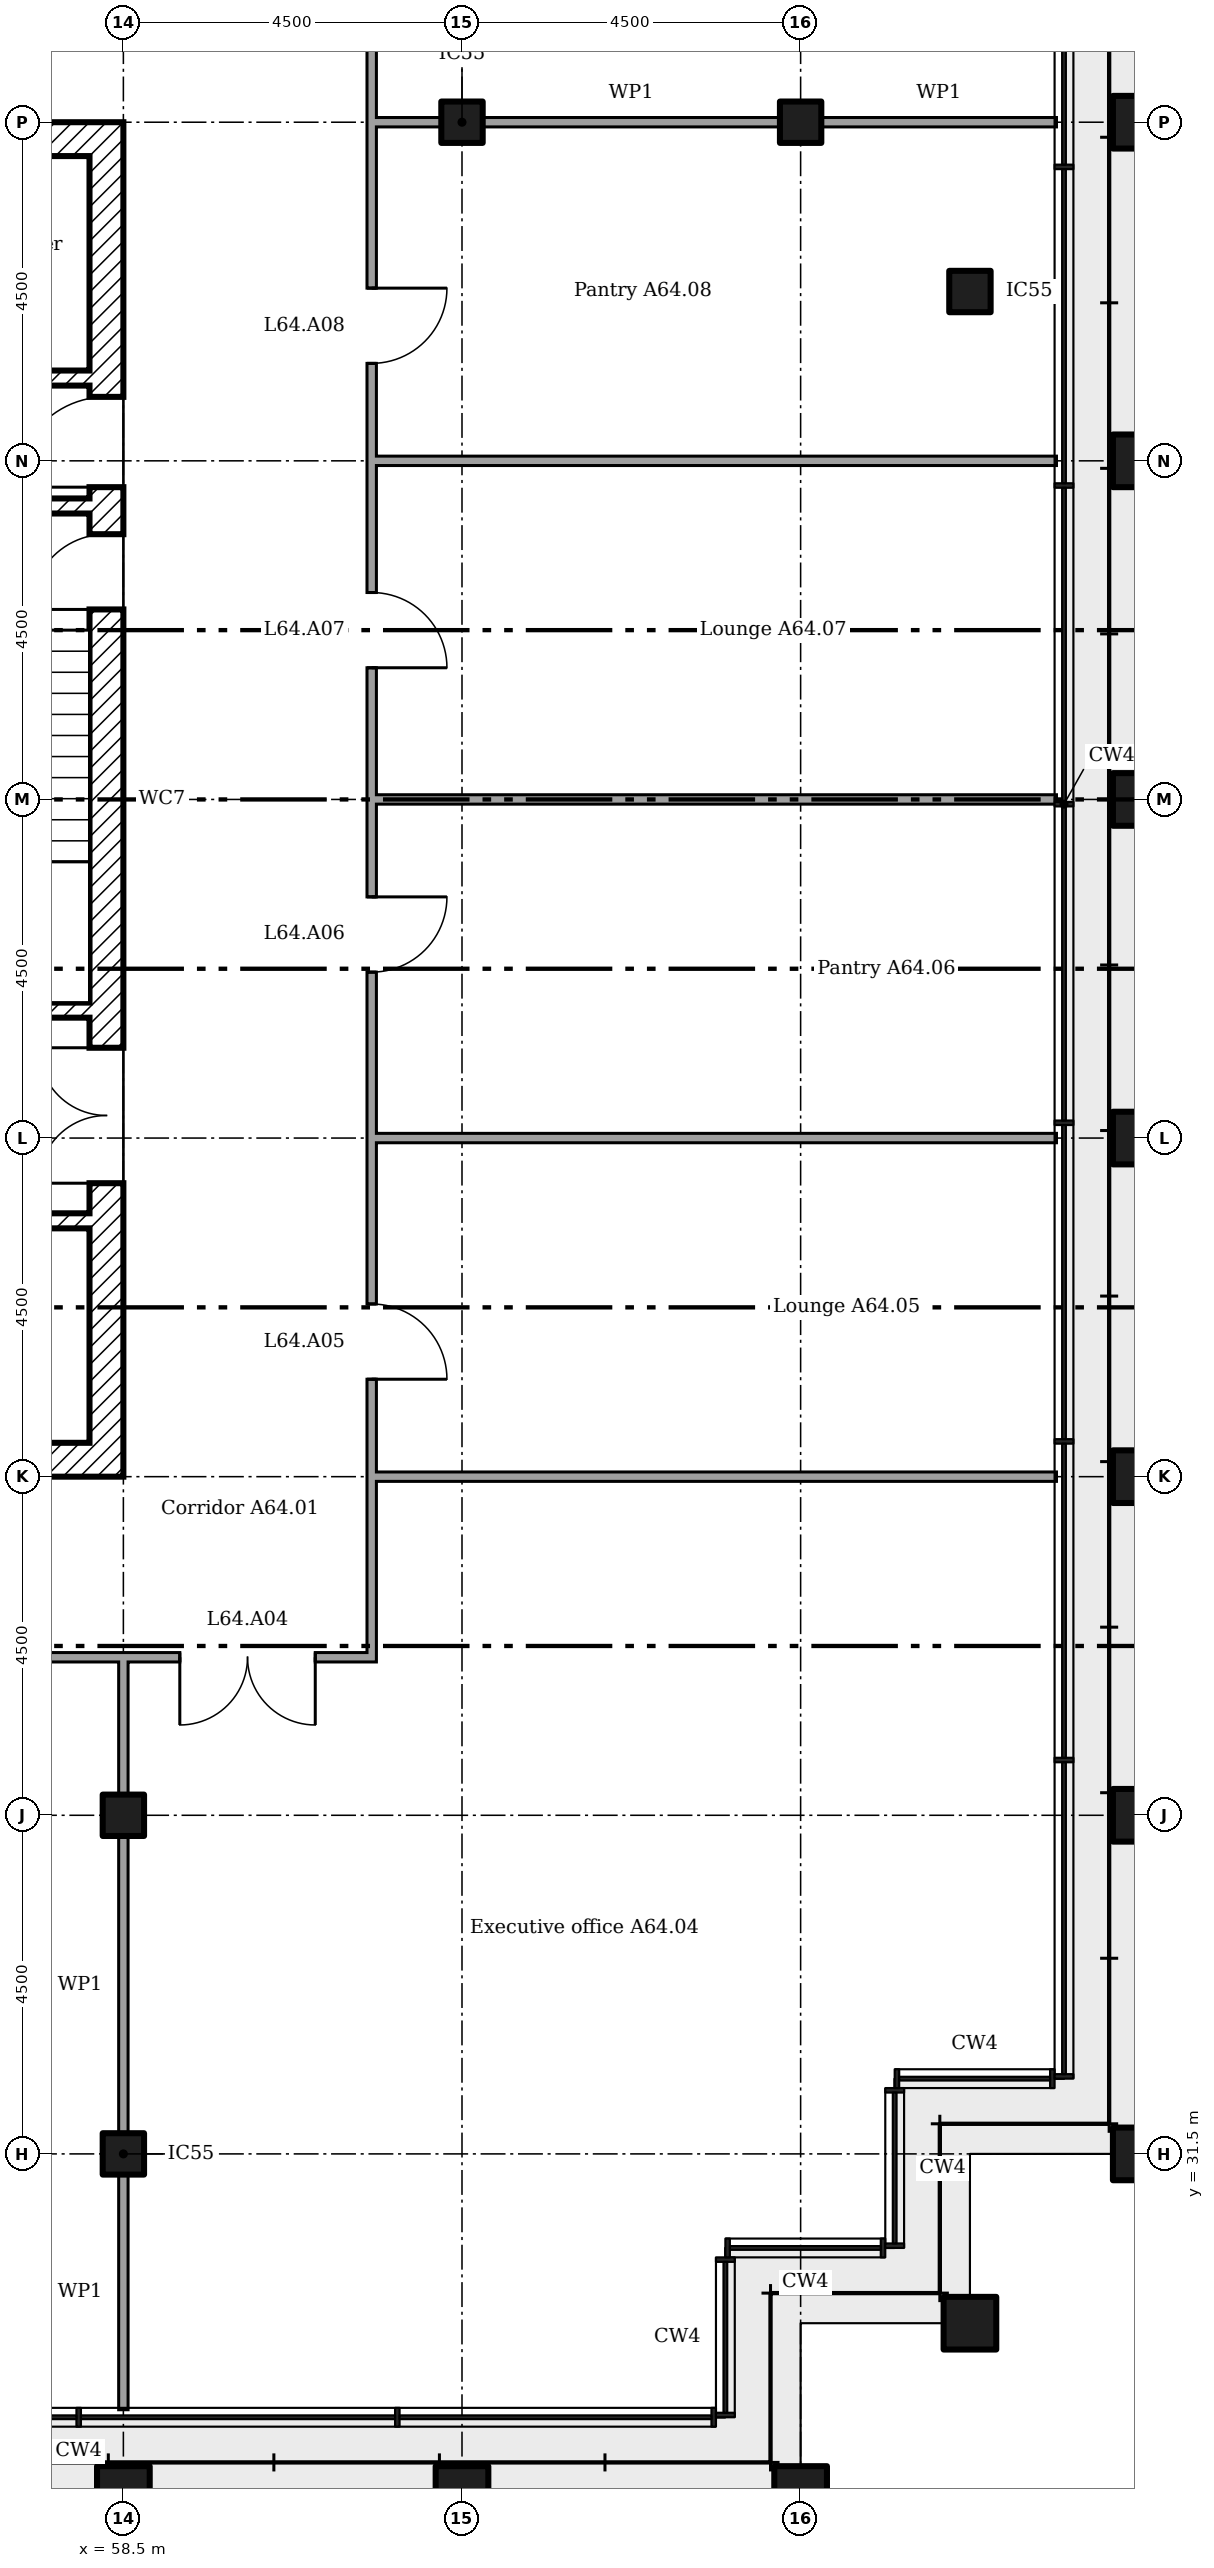
"""IFC4 building model, lengths in metres.
Left out: names, types, materials, properties, quantities, classifications, styles, units other than length and angle.
Written with IfcOpenShell. Run it as: python <this file> out.ifc"""

import sys

from ifc_helpers import new_model, si_unit, direction, frame, frame_2d, origin, origin_2d, place, context, subcontext, project, spatial, rectangle, extrude, element, fill, save


model = new_model("IFC4")
c1 = context("Model", 3, precision=1e-05, world=origin(), true_north=direction((0.0, 1.0)))
c2 = subcontext(c1, "Body", "Model", "MODEL_VIEW")
j1 = project(units=[si_unit("LENGTHUNIT", "METRE"), si_unit("PLANEANGLEUNIT", "RADIAN")], contexts=[c1])
p1 = place(None, origin())
s1 = spatial("IfcSite", under=j1, at=p1, CompositionType="ELEMENT")
p2 = place(p1, origin())
s2 = spatial("IfcBuilding", under=s1, at=p2, CompositionType="ELEMENT")
p3 = place(p2, frame((0.0, 0.0, 251.0)))
s3 = spatial("IfcBuildingStorey", under=s2, at=p3, CompositionType="ELEMENT", Elevation=251.0)
for number, where in (
    (1, (58.5, 27.0, 0.0)),
    (2, (63.0, 27.0, 0.0)),
    (3, (67.5, 27.0, 0.0)),
    (4, (69.75, 29.25, 0.0)),
    (5, (72.0, 31.5, 0.0)),
    (6, (72.0, 36.0, 0.0)),
    (7, (72.0, 40.5, 0.0)),
    (8, (72.0, 45.0, 0.0)),
    (9, (72.0, 49.5, 0.0)),
    (10, (72.0, 54.0, 0.0)),
    (11, (72.0, 58.5, 0.0)),
):
    element("IfcColumn", number, at=place(p3, frame(where)), inside=s3, PredefinedType="COLUMN", context=c2, shape_type="SweptSolid", body=[
        extrude(rectangle(XDim=0.7, YDim=0.7, at=origin_2d()), origin(), (0.0, 0.0, 1.0), 4.2),
    ])
for number, where in (
    (12, (58.5, 31.5, 0.0)),
    (13, (58.5, 36.0, 0.0)),
    (14, (63.0, 58.5, 0.0)),
    (15, (67.5, 58.5, 0.0)),
    (16, (69.75, 56.25, 0.0)),
):
    element("IfcColumn", number, at=place(p3, frame(where)), inside=s3, PredefinedType="COLUMN", context=c2, shape_type="SweptSolid", body=[
        extrude(rectangle(XDim=0.55, YDim=0.55, at=origin_2d()), origin(), (0.0, 0.0, 1.0), 4.2),
    ])
p4 = place(p3, frame((58.275, 40.5, 0.0), z_axis=(0.0, 0.0, 1.0), x_axis=(0.0, 1.0, 0.0)))
e17 = element("IfcWall", 17, at=p4, inside=s3, PredefinedType="SHEAR", context=c2, shape_type="SweptSolid", body=[
    extrude(rectangle(XDim=18.0, YDim=0.45, at=frame_2d((9.0, 0.0))), origin(), (0.0, 0.0, 1.0), 3.78),
])
p5 = place(p4, frame((13.15, 0.0, 0.0)))
e18 = element("IfcOpeningElement", 18, at=p5, cuts=e17, PredefinedType="OPENING", context=c2, shape_type="SweptSolid", body=[
    extrude(rectangle(XDim=1.2, YDim=2.1, at=frame_2d((0.6, 1.05))), frame((0.0, 0.235, 0.0), z_axis=(0.0, -1.0, 0.0), x_axis=(1.0, 0.0, 0.0)), (0.0, 0.0, 1.0), 0.47),
])
p6 = place(p4, frame((3.9, 0.0, 0.0)))
e19 = element("IfcOpeningElement", 19, at=p6, cuts=e17, PredefinedType="OPENING", context=c2, shape_type="SweptSolid", body=[
    extrude(rectangle(XDim=1.8, YDim=2.1, at=frame_2d((0.9, 1.05))), frame((0.0, 0.235, 0.0), z_axis=(0.0, -1.0, 0.0), x_axis=(1.0, 0.0, 0.0)), (0.0, 0.0, 1.0), 0.47),
])
p7 = place(p4, frame((11.525, 0.0, 0.0)))
e20 = element("IfcOpeningElement", 20, at=p7, cuts=e17, PredefinedType="OPENING", context=c2, shape_type="SweptSolid", body=[
    extrude(rectangle(XDim=1.0, YDim=2.1, at=frame_2d((0.5, 1.05))), frame((0.0, 0.235, 0.0), z_axis=(0.0, -1.0, 0.0), x_axis=(1.0, 0.0, 0.0)), (0.0, 0.0, 1.0), 0.47),
])
for number, where in (
    (21, (40.5, 58.275, 0.0)),
    (22, (40.5, 40.725, 0.0)),
):
    element("IfcWall", number, at=place(p3, frame(where)), inside=s3, PredefinedType="SHEAR", context=c2, shape_type="SweptSolid", body=[
        extrude(rectangle(XDim=17.55, YDim=0.45, at=frame_2d((8.775, 0.0))), origin(), (0.0, 0.0, 1.0), 3.78),
    ])
p8 = place(p3, frame((46.933, 55.1, 0.0)))
e23 = element("IfcWall", 23, at=p8, inside=s3, PredefinedType="SHEAR", context=c2, shape_type="SweptSolid", body=[
    extrude(rectangle(XDim=11.117, YDim=0.2, at=frame_2d((5.558, 0.0))), origin(), (0.0, 0.0, 1.0), 3.78),
])
p9 = place(p8, frame((8.833, 0.0, 0.0)))
e24 = element("IfcOpeningElement", 24, at=p9, cuts=e23, PredefinedType="OPENING", context=c2, shape_type="SweptSolid", body=[
    extrude(rectangle(XDim=0.9, YDim=2.1, at=frame_2d((0.45, 1.05))), frame((0.0, 0.11, 0.0), z_axis=(0.0, -1.0, 0.0), x_axis=(1.0, 0.0, 0.0)), (0.0, 0.0, 1.0), 0.22),
])
p10 = place(p8, frame((0.633, 0.0, 0.0)))
e25 = element("IfcOpeningElement", 25, at=p10, cuts=e23, PredefinedType="OPENING", context=c2, shape_type="SweptSolid", body=[
    extrude(rectangle(XDim=1.2, YDim=2.1, at=frame_2d((0.6, 1.05))), frame((0.0, 0.11, 0.0), z_axis=(0.0, -1.0, 0.0), x_axis=(1.0, 0.0, 0.0)), (0.0, 0.0, 1.0), 0.22),
])
p11 = place(p8, frame((3.3, 0.0, 0.0)))
e26 = element("IfcOpeningElement", 26, at=p11, cuts=e23, PredefinedType="OPENING", context=c2, shape_type="SweptSolid", body=[
    extrude(rectangle(XDim=1.2, YDim=2.1, at=frame_2d((0.6, 1.05))), frame((0.0, 0.11, 0.0), z_axis=(0.0, -1.0, 0.0), x_axis=(1.0, 0.0, 0.0)), (0.0, 0.0, 1.0), 0.22),
])
p12 = place(p8, frame((5.967, 0.0, 0.0)))
e27 = element("IfcOpeningElement", 27, at=p12, cuts=e23, PredefinedType="OPENING", context=c2, shape_type="SweptSolid", body=[
    extrude(rectangle(XDim=1.2, YDim=2.1, at=frame_2d((0.6, 1.05))), frame((0.0, 0.11, 0.0), z_axis=(0.0, -1.0, 0.0), x_axis=(1.0, 0.0, 0.0)), (0.0, 0.0, 1.0), 0.22),
])
p13 = place(p3, frame((40.95, 43.9, 0.0)))
e28 = element("IfcWall", 28, at=p13, inside=s3, PredefinedType="SHEAR", context=c2, shape_type="SweptSolid", body=[
    extrude(rectangle(XDim=17.1, YDim=0.2, at=frame_2d((8.55, 0.0))), origin(), (0.0, 0.0, 1.0), 3.78),
])
p14 = place(p13, frame((1.433, 0.0, 0.0)))
e29 = element("IfcOpeningElement", 29, at=p14, cuts=e28, PredefinedType="OPENING", context=c2, shape_type="SweptSolid", body=[
    extrude(rectangle(XDim=0.9, YDim=2.1, at=frame_2d((0.45, 1.05))), frame((0.0, 0.11, 0.0), z_axis=(0.0, -1.0, 0.0), x_axis=(1.0, 0.0, 0.0)), (0.0, 0.0, 1.0), 0.22),
])
p15 = place(p13, frame((4.1, 0.0, 0.0)))
e30 = element("IfcOpeningElement", 30, at=p15, cuts=e28, PredefinedType="OPENING", context=c2, shape_type="SweptSolid", body=[
    extrude(rectangle(XDim=0.9, YDim=2.1, at=frame_2d((0.45, 1.05))), frame((0.0, 0.11, 0.0), z_axis=(0.0, -1.0, 0.0), x_axis=(1.0, 0.0, 0.0)), (0.0, 0.0, 1.0), 0.22),
])
p16 = place(p13, frame((6.767, 0.0, 0.0)))
e31 = element("IfcOpeningElement", 31, at=p16, cuts=e28, PredefinedType="OPENING", context=c2, shape_type="SweptSolid", body=[
    extrude(rectangle(XDim=0.9, YDim=2.1, at=frame_2d((0.45, 1.05))), frame((0.0, 0.11, 0.0), z_axis=(0.0, -1.0, 0.0), x_axis=(1.0, 0.0, 0.0)), (0.0, 0.0, 1.0), 0.22),
])
p17 = place(p13, frame((9.433, 0.0, 0.0)))
e32 = element("IfcOpeningElement", 32, at=p17, cuts=e28, PredefinedType="OPENING", context=c2, shape_type="SweptSolid", body=[
    extrude(rectangle(XDim=0.9, YDim=2.1, at=frame_2d((0.45, 1.05))), frame((0.0, 0.11, 0.0), z_axis=(0.0, -1.0, 0.0), x_axis=(1.0, 0.0, 0.0)), (0.0, 0.0, 1.0), 0.22),
])
p18 = place(p13, frame((12.1, 0.0, 0.0)))
e33 = element("IfcOpeningElement", 33, at=p18, cuts=e28, PredefinedType="OPENING", context=c2, shape_type="SweptSolid", body=[
    extrude(rectangle(XDim=0.9, YDim=2.1, at=frame_2d((0.45, 1.05))), frame((0.0, 0.11, 0.0), z_axis=(0.0, -1.0, 0.0), x_axis=(1.0, 0.0, 0.0)), (0.0, 0.0, 1.0), 0.22),
])
p19 = place(p3, frame((54.8, 53.4, 0.0)))
e34 = element("IfcWall", 34, at=p19, inside=s3, PredefinedType="SHEAR", context=c2, shape_type="SweptSolid", body=[
    extrude(rectangle(XDim=3.25, YDim=0.2, at=frame_2d((1.625, 0.0))), origin(), (0.0, 0.0, 1.0), 3.78),
])
p20 = place(p19, frame((0.95, 0.0, 0.0)))
e35 = element("IfcOpeningElement", 35, at=p20, cuts=e34, PredefinedType="OPENING", context=c2, shape_type="SweptSolid", body=[
    extrude(rectangle(XDim=1.0, YDim=2.1, at=frame_2d((0.5, 1.05))), frame((0.0, 0.11, 0.0), z_axis=(0.0, -1.0, 0.0), x_axis=(1.0, 0.0, 0.0)), (0.0, 0.0, 1.0), 0.22),
])
p21 = place(p3, frame((54.8, 46.7, 0.0)))
e36 = element("IfcWall", 36, at=p21, inside=s3, PredefinedType="SHEAR", context=c2, shape_type="SweptSolid", body=[
    extrude(rectangle(XDim=3.25, YDim=0.2, at=frame_2d((1.625, 0.0))), origin(), (0.0, 0.0, 1.0), 3.78),
])
p22 = place(p3, frame((37.738, 38.1, 0.0)))
e37 = element("IfcWall", 37, at=p22, inside=s3, PredefinedType="PARTITIONING", context=c2, shape_type="SweptSolid", body=[
    extrude(rectangle(XDim=24.125, YDim=0.125, at=frame_2d((12.062, 0.0))), origin(), (0.0, 0.0, 1.0), 4.025),
])
p23 = place(p22, frame((0.512, 0.0, 0.0)))
e38 = element("IfcOpeningElement", 38, at=p23, cuts=e37, PredefinedType="OPENING", context=c2, shape_type="SweptSolid", body=[
    extrude(rectangle(XDim=1.8, YDim=2.1, at=frame_2d((0.9, 1.05))), frame((0.0, 0.073, 0.0), z_axis=(0.0, -1.0, 0.0), x_axis=(1.0, 0.0, 0.0)), (0.0, 0.0, 1.0), 0.145),
])
p24 = place(p22, frame((6.722, 0.0, 0.0)))
e39 = element("IfcOpeningElement", 39, at=p24, cuts=e37, PredefinedType="OPENING", context=c2, shape_type="SweptSolid", body=[
    extrude(rectangle(XDim=1.8, YDim=2.1, at=frame_2d((0.9, 1.05))), frame((0.0, 0.073, 0.0), z_axis=(0.0, -1.0, 0.0), x_axis=(1.0, 0.0, 0.0)), (0.0, 0.0, 1.0), 0.145),
])
p25 = place(p22, frame((18.468, 0.0, 0.0)))
e40 = element("IfcOpeningElement", 40, at=p25, cuts=e37, PredefinedType="OPENING", context=c2, shape_type="SweptSolid", body=[
    extrude(rectangle(XDim=1.0, YDim=2.1, at=frame_2d((0.5, 1.05))), frame((0.0, 0.073, 0.0), z_axis=(0.0, -1.0, 0.0), x_axis=(1.0, 0.0, 0.0)), (0.0, 0.0, 1.0), 0.145),
])
p26 = place(p22, frame((21.512, 0.0, 0.0)))
e41 = element("IfcOpeningElement", 41, at=p26, cuts=e37, PredefinedType="OPENING", context=c2, shape_type="SweptSolid", body=[
    extrude(rectangle(XDim=1.8, YDim=2.1, at=frame_2d((0.9, 1.05))), frame((0.0, 0.073, 0.0), z_axis=(0.0, -1.0, 0.0), x_axis=(1.0, 0.0, 0.0)), (0.0, 0.0, 1.0), 0.145),
])
for number, where in (
    (42, (61.8, 40.5, 0.0)),
    (43, (61.8, 45.0, 0.0)),
    (44, (61.8, 49.5, 0.0)),
    (45, (61.8, 54.0, 0.0)),
):
    element("IfcWall", number, at=place(p3, frame(where)), inside=s3, PredefinedType="PARTITIONING", context=c2, shape_type="SweptSolid", body=[
        extrude(rectangle(XDim=9.1, YDim=0.125, at=frame_2d((4.55, 0.0))), origin(), (0.0, 0.0, 1.0), 3.341),
    ])
p27 = place(p3, frame((61.8, 58.5, 0.0)))
e46 = element("IfcWall", 46, at=p27, inside=s3, PredefinedType="PARTITIONING", context=c2, shape_type="SweptSolid", body=[
    extrude(rectangle(XDim=0.925, YDim=0.125, at=frame_2d((0.462, 0.0))), origin(), (0.0, 0.0, 1.0), 3.251),
])
p28 = place(p3, frame((63.275, 58.5, 0.0)))
e47 = element("IfcWall", 47, at=p28, inside=s3, PredefinedType="PARTITIONING", context=c2, shape_type="SweptSolid", body=[
    extrude(rectangle(XDim=3.95, YDim=0.125, at=frame_2d((1.975, 0.0))), origin(), (0.0, 0.0, 1.0), 3.251),
])
p29 = place(p3, frame((67.775, 58.5, 0.0)))
e48 = element("IfcWall", 48, at=p29, inside=s3, PredefinedType="PARTITIONING", context=c2, shape_type="SweptSolid", body=[
    extrude(rectangle(XDim=3.125, YDim=0.125, at=frame_2d((1.562, 0.0))), origin(), (0.0, 0.0, 1.0), 3.251),
])
p30 = place(p3, frame((58.5, 28.1, 0.0), z_axis=(0.0, 0.0, 1.0), x_axis=(0.0, 1.0, 0.0)))
e49 = element("IfcWall", 49, at=p30, inside=s3, PredefinedType="PARTITIONING", context=c2, shape_type="SweptSolid", body=[
    extrude(rectangle(XDim=3.125, YDim=0.125, at=frame_2d((1.562, 0.0))), origin(), (0.0, 0.0, 1.0), 3.251),
])
p31 = place(p3, frame((58.5, 31.775, 0.0), z_axis=(0.0, 0.0, 1.0), x_axis=(0.0, 1.0, 0.0)))
e50 = element("IfcWall", 50, at=p31, inside=s3, PredefinedType="PARTITIONING", context=c2, shape_type="SweptSolid", body=[
    extrude(rectangle(XDim=3.95, YDim=0.125, at=frame_2d((1.975, 0.0))), origin(), (0.0, 0.0, 1.0), 3.251),
])
p32 = place(p3, frame((58.5, 36.275, 0.0), z_axis=(0.0, 0.0, 1.0), x_axis=(0.0, 1.0, 0.0)))
e51 = element("IfcWall", 51, at=p32, inside=s3, PredefinedType="PARTITIONING", context=c2, shape_type="SweptSolid", body=[
    extrude(rectangle(XDim=1.825, YDim=0.125, at=frame_2d((0.913, 0.0))), origin(), (0.0, 0.0, 1.0), 3.251),
])
p33 = place(p3, frame((61.8, 38.163, 0.0), z_axis=(0.0, 0.0, 1.0), x_axis=(0.0, 1.0, 0.0)))
e52 = element("IfcWall", 52, at=p33, inside=s3, PredefinedType="PARTITIONING", context=c2, shape_type="SweptSolid", body=[
    extrude(rectangle(XDim=22.075, YDim=0.125, at=frame_2d((11.038, 0.0))), origin(), (0.0, 0.0, 1.0), 4.025),
])
p34 = place(p33, frame((3.633, 0.0, 0.0)))
e53 = element("IfcOpeningElement", 53, at=p34, cuts=e52, PredefinedType="OPENING", context=c2, shape_type="SweptSolid", body=[
    extrude(rectangle(XDim=1.0, YDim=2.1, at=frame_2d((0.5, 1.05))), frame((0.0, 0.073, 0.0), z_axis=(0.0, -1.0, 0.0), x_axis=(1.0, 0.0, 0.0)), (0.0, 0.0, 1.0), 0.145),
])
p35 = place(p33, frame((9.042, 0.0, 0.0)))
e54 = element("IfcOpeningElement", 54, at=p35, cuts=e52, PredefinedType="OPENING", context=c2, shape_type="SweptSolid", body=[
    extrude(rectangle(XDim=1.0, YDim=2.1, at=frame_2d((0.5, 1.05))), frame((0.0, 0.073, 0.0), z_axis=(0.0, -1.0, 0.0), x_axis=(1.0, 0.0, 0.0)), (0.0, 0.0, 1.0), 0.145),
])
p36 = place(p33, frame((13.087, 0.0, 0.0)))
e55 = element("IfcOpeningElement", 55, at=p36, cuts=e52, PredefinedType="OPENING", context=c2, shape_type="SweptSolid", body=[
    extrude(rectangle(XDim=1.0, YDim=2.1, at=frame_2d((0.5, 1.05))), frame((0.0, 0.073, 0.0), z_axis=(0.0, -1.0, 0.0), x_axis=(1.0, 0.0, 0.0)), (0.0, 0.0, 1.0), 0.145),
])
p37 = place(p33, frame((17.133, 0.0, 0.0)))
e56 = element("IfcOpeningElement", 56, at=p37, cuts=e52, PredefinedType="OPENING", context=c2, shape_type="SweptSolid", body=[
    extrude(rectangle(XDim=1.0, YDim=2.1, at=frame_2d((0.5, 1.05))), frame((0.0, 0.073, 0.0), z_axis=(0.0, -1.0, 0.0), x_axis=(1.0, 0.0, 0.0)), (0.0, 0.0, 1.0), 0.145),
])
p38 = place(p5, origin())
e57 = element("IfcDoor", 57, at=p38, inside=s3, OperationType="SINGLE_SWING_RIGHT", PredefinedType="DOOR", context=c2, shape_type="SweptSolid", body=[
    extrude(rectangle(XDim=1.2, YDim=2.1, at=frame_2d((0.6, 1.05))), frame((0.0, 0.025, 0.0), z_axis=(0.0, -1.0, 0.0), x_axis=(1.0, 0.0, 0.0)), (0.0, 0.0, 1.0), 0.05),
])
fill(e18, e57)
p39 = place(p6, origin())
e58 = element("IfcDoor", 58, at=p39, inside=s3, OperationType="DOUBLE_DOOR_SINGLE_SWING", PredefinedType="DOOR", context=c2, shape_type="SweptSolid", body=[
    extrude(rectangle(XDim=1.8, YDim=2.1, at=frame_2d((0.9, 1.05))), frame((0.0, 0.025, 0.0), z_axis=(0.0, -1.0, 0.0), x_axis=(1.0, 0.0, 0.0)), (0.0, 0.0, 1.0), 0.05),
])
fill(e19, e58)
p40 = place(p7, origin())
e59 = element("IfcDoor", 59, at=p40, inside=s3, OperationType="SINGLE_SWING_RIGHT", PredefinedType="DOOR", context=c2, shape_type="SweptSolid", body=[
    extrude(rectangle(XDim=1.0, YDim=2.1, at=frame_2d((0.5, 1.05))), frame((0.0, 0.025, 0.0), z_axis=(0.0, -1.0, 0.0), x_axis=(1.0, 0.0, 0.0)), (0.0, 0.0, 1.0), 0.05),
])
fill(e20, e59)
p41 = place(p26, frame((1.8, 0.0, 0.0), x_axis=(-1.0, 0.0, 0.0)))
e60 = element("IfcDoor", 60, at=p41, inside=s3, OperationType="DOUBLE_DOOR_SINGLE_SWING", PredefinedType="DOOR", context=c2, shape_type="SweptSolid", body=[
    extrude(rectangle(XDim=1.8, YDim=2.1, at=frame_2d((0.9, 1.05))), frame((0.0, 0.025, 0.0), z_axis=(0.0, -1.0, 0.0), x_axis=(1.0, 0.0, 0.0)), (0.0, 0.0, 1.0), 0.05),
])
fill(e41, e60)
p42 = place(p34, frame((1.0, 0.0, 0.0), x_axis=(-1.0, 0.0, 0.0)))
e61 = element("IfcDoor", 61, at=p42, inside=s3, OperationType="SINGLE_SWING_LEFT", PredefinedType="DOOR", context=c2, shape_type="SweptSolid", body=[
    extrude(rectangle(XDim=1.0, YDim=2.1, at=frame_2d((0.5, 1.05))), frame((0.0, 0.025, 0.0), z_axis=(0.0, -1.0, 0.0), x_axis=(1.0, 0.0, 0.0)), (0.0, 0.0, 1.0), 0.05),
])
fill(e53, e61)
p43 = place(p35, frame((1.0, 0.0, 0.0), x_axis=(-1.0, 0.0, 0.0)))
e62 = element("IfcDoor", 62, at=p43, inside=s3, OperationType="SINGLE_SWING_RIGHT", PredefinedType="DOOR", context=c2, shape_type="SweptSolid", body=[
    extrude(rectangle(XDim=1.0, YDim=2.1, at=frame_2d((0.5, 1.05))), frame((0.0, 0.025, 0.0), z_axis=(0.0, -1.0, 0.0), x_axis=(1.0, 0.0, 0.0)), (0.0, 0.0, 1.0), 0.05),
])
fill(e54, e62)
p44 = place(p36, frame((1.0, 0.0, 0.0), x_axis=(-1.0, 0.0, 0.0)))
e63 = element("IfcDoor", 63, at=p44, inside=s3, OperationType="SINGLE_SWING_LEFT", PredefinedType="DOOR", context=c2, shape_type="SweptSolid", body=[
    extrude(rectangle(XDim=1.0, YDim=2.1, at=frame_2d((0.5, 1.05))), frame((0.0, 0.025, 0.0), z_axis=(0.0, -1.0, 0.0), x_axis=(1.0, 0.0, 0.0)), (0.0, 0.0, 1.0), 0.05),
])
fill(e55, e63)
p45 = place(p37, frame((1.0, 0.0, 0.0), x_axis=(-1.0, 0.0, 0.0)))
e64 = element("IfcDoor", 64, at=p45, inside=s3, OperationType="SINGLE_SWING_RIGHT", PredefinedType="DOOR", context=c2, shape_type="SweptSolid", body=[
    extrude(rectangle(XDim=1.0, YDim=2.1, at=frame_2d((0.5, 1.05))), frame((0.0, 0.025, 0.0), z_axis=(0.0, -1.0, 0.0), x_axis=(1.0, 0.0, 0.0)), (0.0, 0.0, 1.0), 0.05),
])
fill(e56, e64)
save(model, sys.argv[1])
